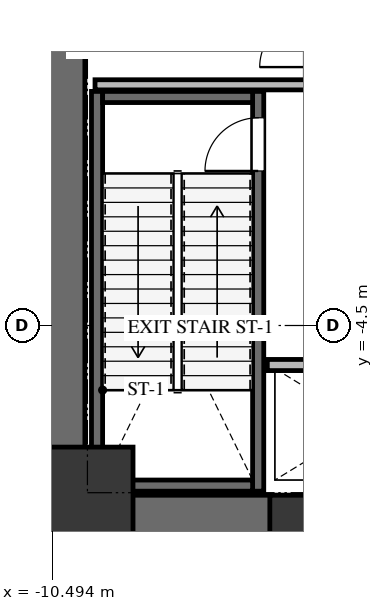
"""IFC4 building model, lengths in metres.
Left out: names, types, materials, properties, quantities, classifications, styles, units other than length and angle.
Written with IfcOpenShell. Run it as: python <this file> out.ifc"""

import sys

from ifc_helpers import new_model, si_unit, direction, frame, frame_2d, origin, origin_2d, place, context, subcontext, project, spatial, rectangle, extrude, source, transform, mapped, element, fill, save


model = new_model("IFC4")
c1 = context("Model", 3, precision=1e-05, world=origin(), true_north=direction((0.0, 1.0)))
c2 = subcontext(c1, "Body", "Model", "MODEL_VIEW")
j1 = project(units=[si_unit("LENGTHUNIT", "METRE"), si_unit("PLANEANGLEUNIT", "RADIAN")], contexts=[c1])
p1 = place(None, origin())
s1 = spatial("IfcSite", under=j1, at=p1, CompositionType="ELEMENT")
p2 = place(p1, origin())
s2 = spatial("IfcBuilding", under=s1, at=p2, CompositionType="ELEMENT")
p3 = place(p2, frame((0.0, 0.0, 21.2)))
s3 = spatial("IfcBuildingStorey", under=s2, at=p3, CompositionType="ELEMENT", Elevation=21.2)
p4 = place(p3, frame((-10.3, -8.75, 0.0), z_axis=(0.0, 0.0, 1.0), x_axis=(0.0, 1.0, 0.0)))
e1 = element("IfcWall", 1, at=p4, inside=s3, PredefinedType="SHEAR", context=c2, shape_type="SweptSolid", body=[
    extrude(rectangle(XDim=17.5, YDim=0.9, at=frame_2d((8.75, 0.0))), origin(), (0.0, 0.0, 1.0), 5.6),
])
p5 = place(p3, frame((-9.85, -8.3, 0.0), z_axis=(0.0, 0.0, 1.0), x_axis=(1.0, 0.0, 0.0)))
e2 = element("IfcWall", 2, at=p5, inside=s3, PredefinedType="SHEAR", context=c2, shape_type="SweptSolid", body=[
    extrude(rectangle(XDim=7.75, YDim=0.9, at=frame_2d((3.875, 0.0))), origin(), (0.0, 0.0, 1.0), 5.6),
])
p6 = place(p3, frame((-6.43, -7.77, -0.32), z_axis=(0.0, 0.0, 1.0), x_axis=(0.0, 1.0, 0.0)))
e3 = element("IfcWall", 3, at=p6, inside=s3, PredefinedType="SHEAR", context=c2, shape_type="SweptSolid", body=[
    extrude(rectangle(XDim=7.89, YDim=0.22, at=frame_2d((3.945, 0.0))), origin(), (0.0, 0.0, 1.0), 5.6),
])
p7 = place(p6, frame((6.32, 0.0, 0.0)))
e4 = element("IfcOpeningElement", 4, at=p7, cuts=e3, PredefinedType="OPENING", context=c2, shape_type="SweptSolid", body=[
    extrude(rectangle(XDim=1.05, YDim=2.15, at=frame_2d((0.525, 1.075))), frame((0.0, 0.12, 0.0), z_axis=(0.0, -1.0, 0.0), x_axis=(1.0, 0.0, 0.0)), (0.0, 0.0, 1.0), 0.24),
])
p8 = place(p3, frame((-9.61, 0.12, -0.32), z_axis=(0.0, 0.0, 1.0), x_axis=(0.0, -1.0, 0.0)))
e5 = element("IfcWall", 5, at=p8, inside=s3, PredefinedType="SHEAR", context=c2, shape_type="SweptSolid", body=[
    extrude(rectangle(XDim=7.89, YDim=0.22, at=frame_2d((3.945, 0.0))), origin(), (0.0, 0.0, 1.0), 5.6),
])
for number, where, z_axis, x_axis in (
    (6, (-9.5, -7.66, -0.32), (0.0, 0.0, 1.0), (1.0, 0.0, 0.0)),
    (7, (-6.54, 0.01, -0.32), (0.0, 0.0, 1.0), (-1.0, 0.0, 0.0)),
):
    element("IfcWall", number, at=place(p3, frame(where, z_axis=z_axis, x_axis=x_axis)), inside=s3, PredefinedType="SHEAR", context=c2, shape_type="SweptSolid", body=[
        extrude(rectangle(XDim=2.96, YDim=0.22, at=frame_2d((1.48, 0.0))), origin(), (0.0, 0.0, 1.0), 5.6),
    ])
m1 = source(origin(), c2, "Body", "SweptSolid", [
    extrude(rectangle(XDim=1.8, YDim=1.8, at=origin_2d()), origin(), (0.0, 0.0, 1.0), 5.6),
])
p9 = place(p3, frame((-9.8, -7.8, -0.32), z_axis=(0.0, 0.0, 1.0), x_axis=(1.0, 0.0, 0.0)))
e8 = element("IfcColumn", 8, at=p9, inside=s3, PredefinedType="COLUMN", context=c2, shape_type="MappedRepresentation", body=[
    mapped(m1, transform((0.0, 0.0, 0.0), x_axis=(1.0, 0.0, 0.0), y_axis=(0.0, 1.0, 0.0), z_axis=(0.0, 0.0, 1.0), scale=1.0)),
])
m2 = source(origin(), c2, "Body", "SweptSolid", [
    extrude(rectangle(XDim=0.8, YDim=0.8, at=origin_2d()), origin(), (0.0, 0.0, 1.0), 5.6),
])
p10 = place(p3, frame((-5.8, -8.25, -0.32), z_axis=(0.0, 0.0, 1.0), x_axis=(1.0, 0.0, 0.0)))
e9 = element("IfcColumn", 9, at=p10, inside=s3, PredefinedType="PILASTER", context=c2, shape_type="MappedRepresentation", body=[
    mapped(m2, transform((0.0, 0.0, 0.0), x_axis=(1.0, 0.0, 0.0), y_axis=(0.0, 1.0, 0.0), z_axis=(0.0, 0.0, 1.0), scale=1.0)),
])
p11 = place(p3, frame((-9.65, 0.25, 0.0), z_axis=(0.0, 0.0, 1.0), x_axis=(1.0, 0.0, 0.0)))
e10 = element("IfcWall", 10, at=p11, inside=s3, PredefinedType="SOLIDWALL", context=c2, shape_type="SweptSolid", body=[
    extrude(rectangle(XDim=4.27, YDim=0.2, at=frame_2d((2.135, 0.0))), origin(), (0.0, 0.0, 1.0), 5.265),
])
p12 = place(p3, frame((-6.25, -5.28, 0.0), z_axis=(0.0, 0.0, 1.0), x_axis=(1.0, 0.0, 0.0)))
e11 = element("IfcWall", 11, at=p12, inside=s3, PredefinedType="SOLIDWALL", context=c2, shape_type="SweptSolid", body=[
    extrude(rectangle(XDim=3.9, YDim=0.22, at=frame_2d((1.95, 0.0))), origin(), (0.0, 0.0, 1.0), 5.265),
])
m3 = source(origin(), c2, "Body", "SweptSolid", [
    extrude(rectangle(XDim=1.05, YDim=2.15, at=frame_2d((0.525, 1.075))), frame((0.0, 0.025, 0.0), z_axis=(0.0, -1.0, 0.0), x_axis=(1.0, 0.0, 0.0)), (0.0, 0.0, 1.0), 0.05),
])
p13 = place(p7, origin())
e12 = element("IfcDoor", 12, at=p13, inside=s3, OperationType="SINGLE_SWING_LEFT", PredefinedType="DOOR", context=c2, shape_type="MappedRepresentation", body=[
    mapped(m3, transform((0.0, 0.0, 0.0), x_axis=(1.0, 0.0, 0.0), y_axis=(0.0, 1.0, 0.0), z_axis=(0.0, 0.0, 1.0), scale=1.0)),
])
fill(e4, e12)
save(model, sys.argv[1])
